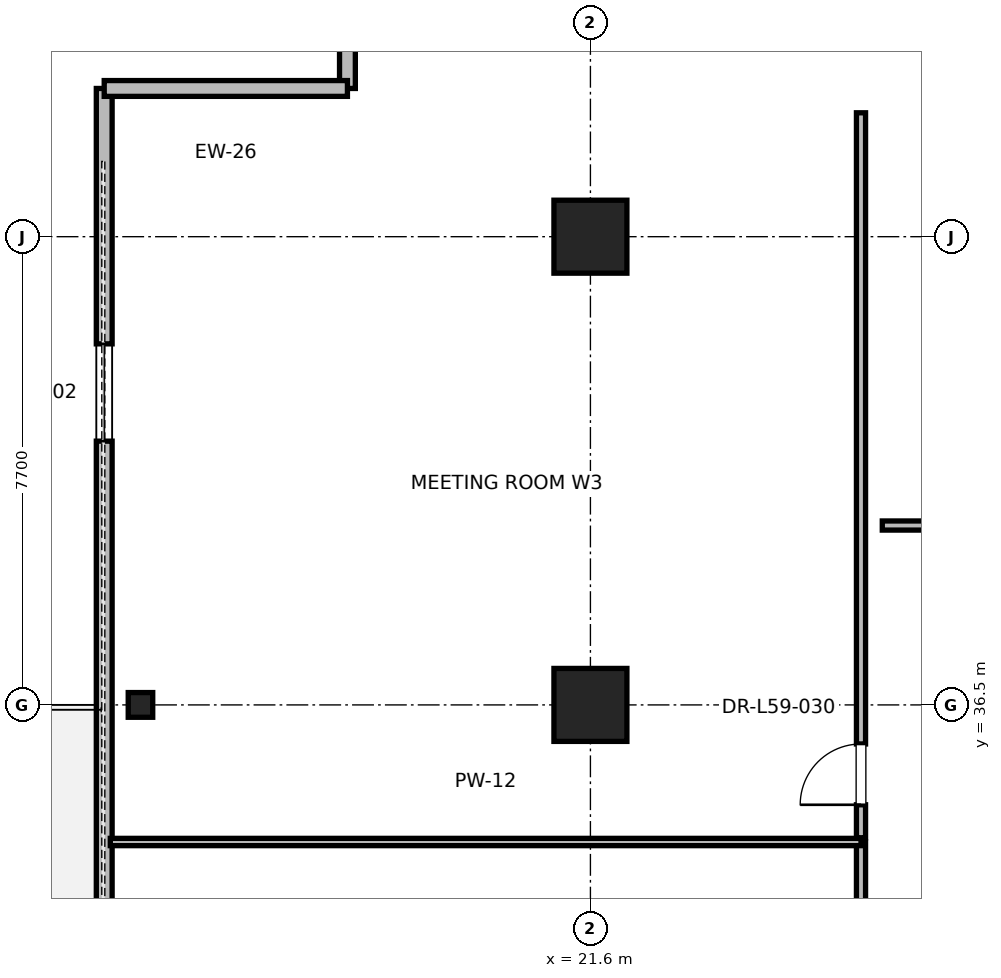
"""IFC4 building model, lengths in metres.
Left out: names, types, materials, properties, quantities, classifications, styles, units other than length and angle.
Written with IfcOpenShell. Run it as: python <this file> out.ifc"""

import sys

from ifc_helpers import new_model, si_unit, direction, frame, frame_2d, origin, origin_2d, place, context, subcontext, project, spatial, rectangle, i_section, extrude, element, fill, save


model = new_model("IFC4")
c1 = context("Model", 3, precision=1e-05, world=origin(), true_north=direction((0.0, 1.0)))
c2 = subcontext(c1, "Body", "Model", "MODEL_VIEW")
j1 = project(units=[si_unit("LENGTHUNIT", "METRE"), si_unit("PLANEANGLEUNIT", "RADIAN")], contexts=[c1])
p1 = place(None, origin())
s1 = spatial("IfcSite", under=j1, at=p1, CompositionType="ELEMENT")
p2 = place(p1, origin())
s2 = spatial("IfcBuilding", under=s1, at=p2, CompositionType="ELEMENT")
p3 = place(p2, frame((0.0, 0.0, 255.2)))
s3 = spatial("IfcBuildingStorey", under=s2, at=p3, CompositionType="ELEMENT", Elevation=255.2)
for number, where, z_axis, x_axis in (
    (1, (21.6, 36.5, 0.0), (0.0, 0.0, 1.0), (1.0, 0.0, 0.0)),
    (2, (21.6, 44.2, 0.0), (0.0, 0.0, 1.0), (1.0, 0.0, 0.0)),
):
    element("IfcColumn", number, at=place(p3, frame(where, z_axis=z_axis, x_axis=x_axis)), inside=s3, PredefinedType="COLUMN", context=c2, shape_type="SweptSolid", body=[
        extrude(rectangle(XDim=1.2, YDim=1.2, at=origin_2d()), origin(), (0.0, 0.0, 1.0), 4.0),
    ])
p4 = place(p3, frame((14.2, 36.5, 0.0), z_axis=(0.0, 0.0, 1.0), x_axis=(1.0, 0.0, 0.0)))
e3 = element("IfcColumn", 3, at=p4, inside=s3, PredefinedType="COLUMN", context=c2, shape_type="SweptSolid", body=[
    extrude(i_section(OverallWidth=0.403, OverallDepth=0.406, WebThickness=0.027, FlangeThickness=0.043, FilletRadius=0.015, at=origin_2d()), origin(), (0.0, 0.0, 1.0), 4.0),
])
p5 = place(p3, frame((13.604, 46.638, 0.0), z_axis=(0.0, 0.0, 1.0), x_axis=(0.0, -1.0, 0.0)))
e4 = element("IfcWall", 4, at=p5, inside=s3, PredefinedType="PARAPET", context=c2, shape_type="SweptSolid", body=[
    extrude(rectangle(XDim=38.275, YDim=0.26, at=frame_2d((19.138, 0.0))), origin(), (0.0, 0.0, 1.0), 3.785),
])
p6 = place(p5, frame((4.2, 0.0, 0.85)))
e5 = element("IfcOpeningElement", 5, at=p6, cuts=e4, PredefinedType="OPENING", context=c2, shape_type="SweptSolid", body=[
    extrude(rectangle(XDim=1.6, YDim=2.1, at=frame_2d((0.8, 1.05))), frame((0.0, 0.13, 0.0), z_axis=(0.0, -1.0, 0.0), x_axis=(1.0, 0.0, 0.0)), (0.0, 0.0, 1.0), 0.26),
])
p7 = place(p5, frame((18.538, 0.0, 0.0)))
e6 = element("IfcOpeningElement", 6, at=p7, cuts=e4, PredefinedType="OPENING", context=c2, shape_type="SweptSolid", body=[
    extrude(rectangle(XDim=1.2, YDim=2.2, at=frame_2d((0.6, 1.1))), frame((0.0, 0.13, 0.0), z_axis=(0.0, -1.0, 0.0), x_axis=(1.0, 0.0, 0.0)), (0.0, 0.0, 1.0), 0.26),
])
p8 = place(p5, frame((32.475, 0.0, 0.85)))
e7 = element("IfcOpeningElement", 7, at=p8, cuts=e4, PredefinedType="OPENING", context=c2, shape_type="SweptSolid", body=[
    extrude(rectangle(XDim=1.6, YDim=2.1, at=frame_2d((0.8, 1.05))), frame((0.0, 0.13, 0.0), z_axis=(0.0, -1.0, 0.0), x_axis=(1.0, 0.0, 0.0)), (0.0, 0.0, 1.0), 0.26),
])
p9 = place(p3, frame((17.604, 50.138, 0.0), z_axis=(0.0, 0.0, 1.0), x_axis=(0.0, -1.0, 0.0)))
e8 = element("IfcWall", 8, at=p9, inside=s3, PredefinedType="PARAPET", context=c2, shape_type="SweptSolid", body=[
    extrude(rectangle(XDim=3.5, YDim=0.26, at=frame_2d((1.75, 0.0))), origin(), (0.0, 0.0, 1.0), 3.785),
])
p10 = place(p9, frame((1.05, 0.0, 0.85)))
e9 = element("IfcOpeningElement", 9, at=p10, cuts=e8, PredefinedType="OPENING", context=c2, shape_type="SweptSolid", body=[
    extrude(rectangle(XDim=1.4, YDim=2.0, at=frame_2d((0.7, 1.0))), frame((0.0, 0.13, 0.0), z_axis=(0.0, -1.0, 0.0), x_axis=(1.0, 0.0, 0.0)), (0.0, 0.0, 1.0), 0.26),
])
p11 = place(p3, frame((17.604, 46.638, 0.0), z_axis=(0.0, 0.0, 1.0), x_axis=(-1.0, 0.0, 0.0)))
e10 = element("IfcWall", 10, at=p11, inside=s3, PredefinedType="PARAPET", context=c2, shape_type="SweptSolid", body=[
    extrude(rectangle(XDim=4.0, YDim=0.26, at=frame_2d((2.0, 0.0))), origin(), (0.0, 0.0, 1.0), 3.785),
])
p12 = place(p3, frame((26.4, 39.45, 0.0), z_axis=(0.0, 0.0, 1.0), x_axis=(1.0, 0.0, 0.0)))
e11 = element("IfcWall", 11, at=p12, inside=s3, PredefinedType="PARTITIONING", context=c2, shape_type="SweptSolid", body=[
    extrude(rectangle(XDim=8.704, YDim=0.15, at=frame_2d((4.352, 0.0))), origin(), (0.0, 0.0, 1.0), 2.85),
])
p13 = place(p12, frame((3.867, 0.0, 0.0)))
e12 = element("IfcOpeningElement", 12, at=p13, cuts=e11, PredefinedType="OPENING", context=c2, shape_type="SweptSolid", body=[
    extrude(rectangle(XDim=1.0, YDim=2.15, at=frame_2d((0.5, 1.075))), frame((0.0, 0.075, 0.0), z_axis=(0.0, -1.0, 0.0), x_axis=(1.0, 0.0, 0.0)), (0.0, 0.0, 1.0), 0.15),
])
p14 = place(p3, frame((26.05, 21.574, 0.0), z_axis=(0.0, 0.0, 1.0), x_axis=(0.0, 1.0, 0.0)))
e13 = element("IfcWall", 13, at=p14, inside=s3, PredefinedType="PARTITIONING", context=c2, shape_type="SweptSolid", body=[
    extrude(rectangle(XDim=12.672, YDim=0.15, at=frame_2d((6.336, 0.0))), origin(), (0.0, 0.0, 1.0), 2.85),
])
p15 = place(p14, frame((5.551, 0.0, 0.0)))
e14 = element("IfcOpeningElement", 14, at=p15, cuts=e13, PredefinedType="OPENING", context=c2, shape_type="SweptSolid", body=[
    extrude(rectangle(XDim=1.5, YDim=2.25, at=frame_2d((0.75, 1.125))), frame((0.0, 0.075, 0.0), z_axis=(0.0, -1.0, 0.0), x_axis=(1.0, 0.0, 0.0)), (0.0, 0.0, 1.0), 0.15),
])
p16 = place(p3, frame((13.704, 34.246, 0.0), z_axis=(0.0, 0.0, 1.0), x_axis=(1.0, 0.0, 0.0)))
e15 = element("IfcWall", 15, at=p16, inside=s3, PredefinedType="PARTITIONING", context=c2, shape_type="SweptSolid", body=[
    extrude(rectangle(XDim=12.346, YDim=0.12, at=frame_2d((6.173, 0.0))), origin(), (0.0, 0.0, 1.0), 2.85),
])
p17 = place(p3, frame((26.05, 34.315, 0.0), z_axis=(0.0, 0.0, 1.0), x_axis=(0.0, 1.0, 0.0)))
e16 = element("IfcWall", 16, at=p17, inside=s3, PredefinedType="PARTITIONING", context=c2, shape_type="SweptSolid", body=[
    extrude(rectangle(XDim=11.922, YDim=0.15, at=frame_2d((5.961, 0.0))), origin(), (0.0, 0.0, 1.0), 2.85),
])
p18 = place(p17, frame((0.542, 0.0, 0.0)))
e17 = element("IfcOpeningElement", 17, at=p18, cuts=e16, PredefinedType="OPENING", context=c2, shape_type="SweptSolid", body=[
    extrude(rectangle(XDim=1.0, YDim=2.15, at=frame_2d((0.5, 1.075))), frame((0.0, 0.075, 0.0), z_axis=(0.0, -1.0, 0.0), x_axis=(1.0, 0.0, 0.0)), (0.0, 0.0, 1.0), 0.15),
])
p19 = place(p6, origin())
e18 = element("IfcWindow", 18, at=p19, inside=s3, PartitioningType="SINGLE_PANEL", PredefinedType="WINDOW", context=c2, shape_type="SweptSolid", body=[
    extrude(rectangle(XDim=1.6, YDim=2.1, at=frame_2d((0.8, 1.05))), frame((0.0, 0.03, 0.0), z_axis=(0.0, -1.0, 0.0), x_axis=(1.0, 0.0, 0.0)), (0.0, 0.0, 1.0), 0.06),
])
fill(e5, e18)
p20 = place(p18, origin())
e19 = element("IfcDoor", 19, at=p20, inside=s3, OperationType="SINGLE_SWING_LEFT", PredefinedType="DOOR", context=c2, shape_type="SweptSolid", body=[
    extrude(rectangle(XDim=1.0, YDim=2.15, at=frame_2d((0.5, 1.075))), frame((0.0, 0.025, 0.0), z_axis=(0.0, -1.0, 0.0), x_axis=(1.0, 0.0, 0.0)), (0.0, 0.0, 1.0), 0.05),
])
fill(e17, e19)
save(model, sys.argv[1])
